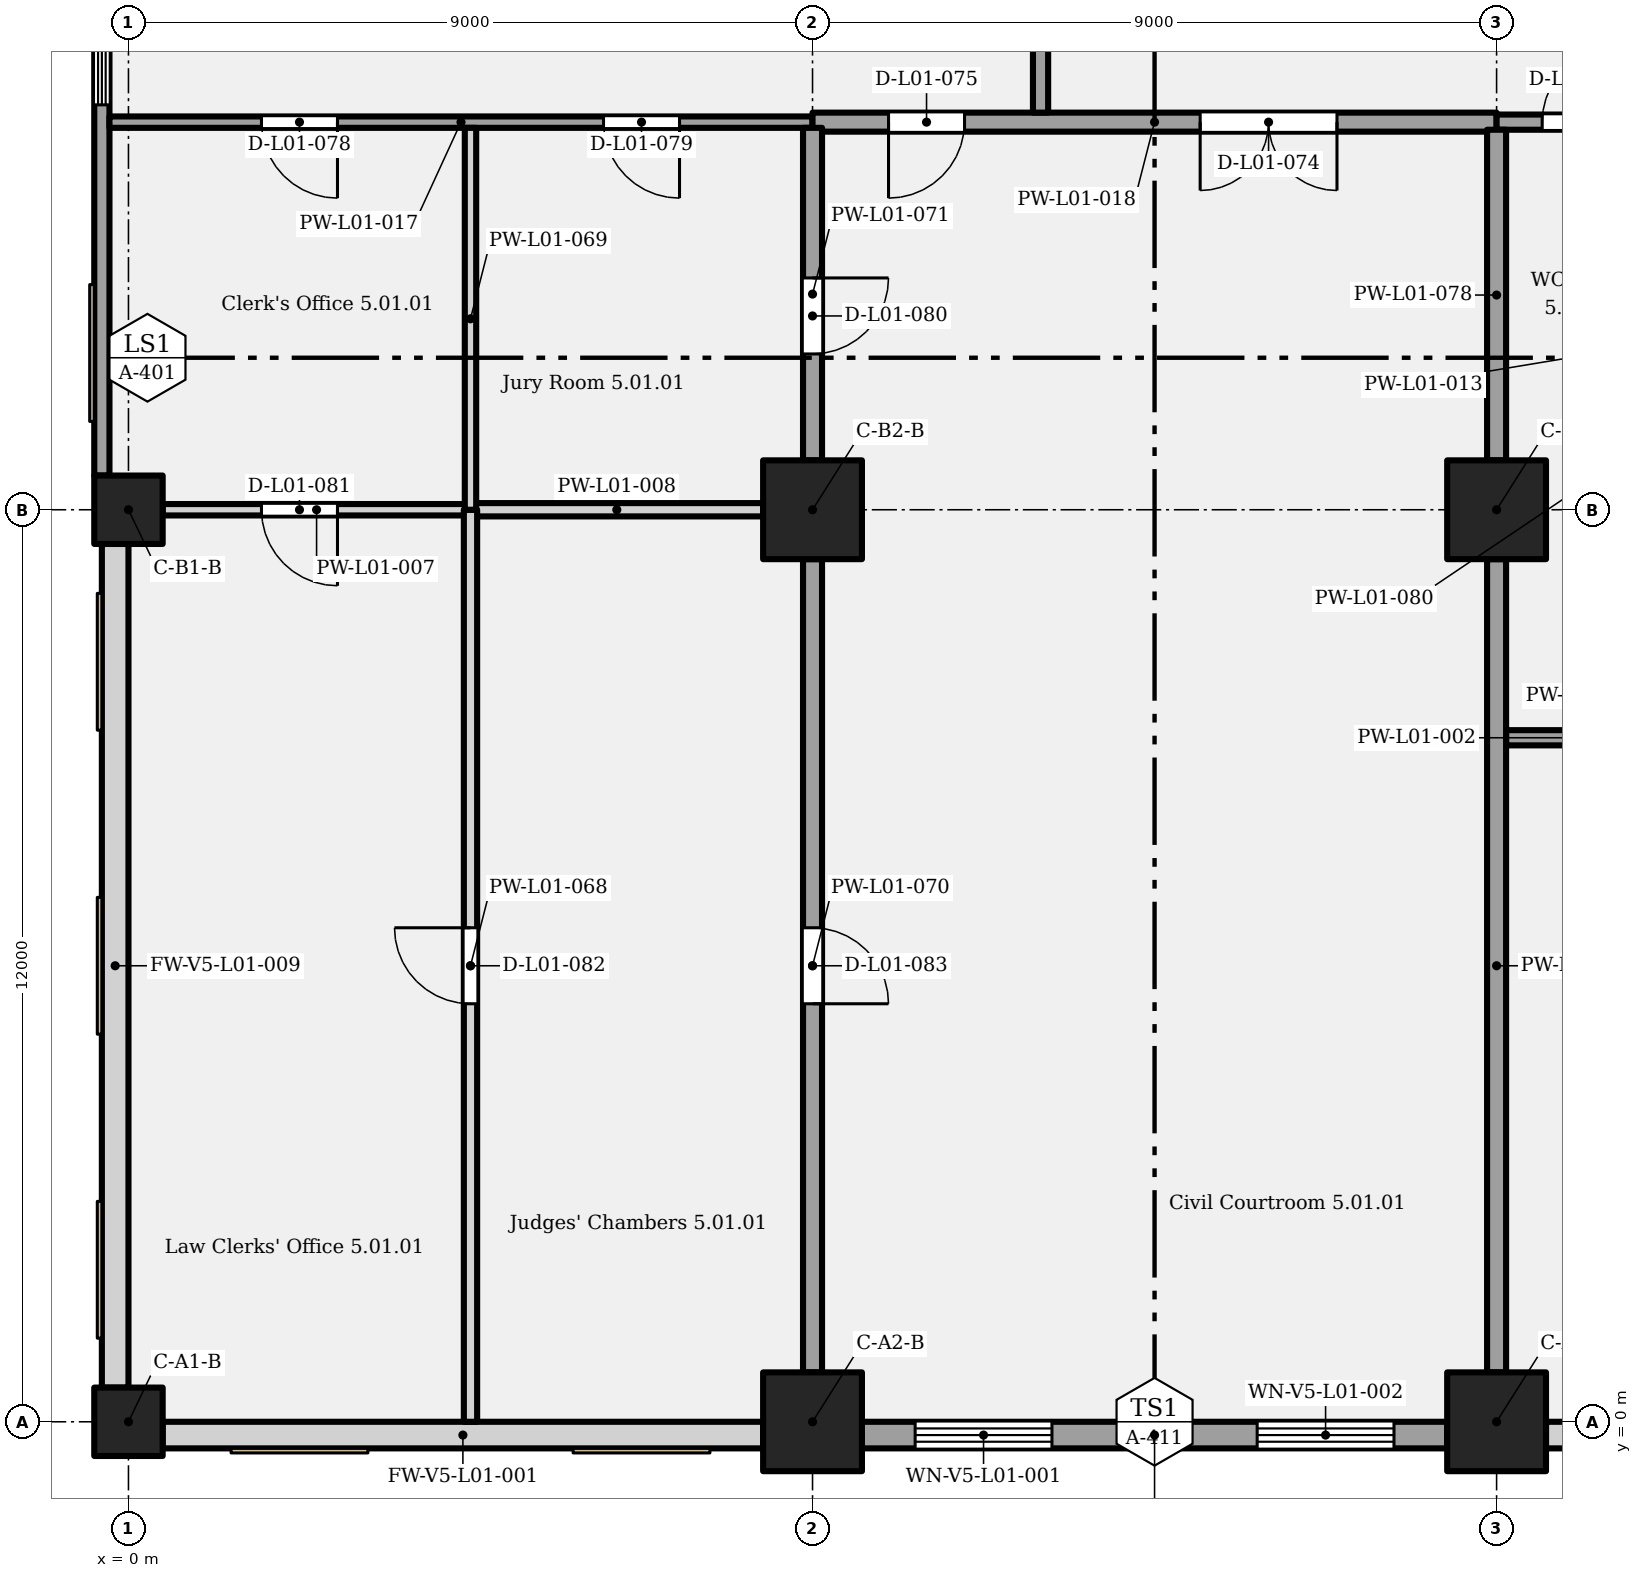
"""IFC4 building model, lengths in metres.
Left out: names, types, materials, properties, quantities, classifications, styles, units other than length and angle.
Written with IfcOpenShell. Run it as: python <this file> out.ifc"""

import sys

from ifc_helpers import new_model, si_unit, direction, frame, frame_2d, origin, origin_with_axes, origin_2d, place, context, subcontext, project, spatial, rectangle, extrude, element, fill, save


model = new_model("IFC4")
c1 = context("Model", 3, precision=1e-05, world=origin(), true_north=direction((0.0, 1.0)))
c2 = subcontext(c1, "Body", "Model", "MODEL_VIEW")
j1 = project(units=[si_unit("LENGTHUNIT", "METRE"), si_unit("PLANEANGLEUNIT", "RADIAN")], contexts=[c1])
p1 = place(None, origin())
s1 = spatial("IfcSite", under=j1, at=p1, CompositionType="ELEMENT")
p2 = place(p1, origin())
s2 = spatial("IfcBuilding", under=s1, at=p2, CompositionType="ELEMENT")
p3 = place(p2, frame((0.0, 0.0, 6.6)))
s3 = spatial("IfcBuildingStorey", under=s2, at=p3, CompositionType="ELEMENT", Elevation=6.6)
p4 = place(p3, origin_with_axes())
e1 = element("IfcColumn", 1, at=p4, inside=s3, PredefinedType="COLUMN", context=c2, shape_type="SweptSolid", body=[
    extrude(rectangle(XDim=0.9, YDim=0.9, at=origin_2d()), origin(), (0.0, 0.0, 1.0), 5.4),
])
for number, where, z_axis, x_axis in (
    (2, (9.0, 0.0, 0.0), (0.0, 0.0, 1.0), (1.0, 0.0, 0.0)),
    (3, (18.0, 0.0, 0.0), (0.0, 0.0, 1.0), (1.0, 0.0, 0.0)),
):
    element("IfcColumn", number, at=place(p3, frame(where, z_axis=z_axis, x_axis=x_axis)), inside=s3, PredefinedType="COLUMN", context=c2, shape_type="SweptSolid", body=[
        extrude(rectangle(XDim=1.3, YDim=1.3, at=origin_2d()), origin(), (0.0, 0.0, 1.0), 5.4),
    ])
p5 = place(p3, frame((0.0, 12.0, 0.0), z_axis=(0.0, 0.0, 1.0), x_axis=(1.0, 0.0, 0.0)))
e4 = element("IfcColumn", 4, at=p5, inside=s3, PredefinedType="COLUMN", context=c2, shape_type="SweptSolid", body=[
    extrude(rectangle(XDim=0.9, YDim=0.9, at=origin_2d()), origin(), (0.0, 0.0, 1.0), 5.4),
])
for number, where, z_axis, x_axis in (
    (5, (9.0, 12.0, 0.0), (0.0, 0.0, 1.0), (1.0, 0.0, 0.0)),
    (6, (18.0, 12.0, 0.0), (0.0, 0.0, 1.0), (1.0, 0.0, 0.0)),
):
    element("IfcColumn", number, at=place(p3, frame(where, z_axis=z_axis, x_axis=x_axis)), inside=s3, PredefinedType="COLUMN", context=c2, shape_type="SweptSolid", body=[
        extrude(rectangle(XDim=1.3, YDim=1.3, at=origin_2d()), origin(), (0.0, 0.0, 1.0), 5.4),
    ])
p6 = place(p3, frame((0.45, -0.175, 0.0), z_axis=(0.0, 0.0, 1.0), x_axis=(1.0, 0.0, 0.0)))
e7 = element("IfcWall", 7, at=p6, inside=s3, PredefinedType="SOLIDWALL", context=c2, shape_type="SweptSolid", body=[
    extrude(rectangle(XDim=7.9, YDim=0.35, at=frame_2d((3.95, 0.0))), origin(), (0.0, 0.0, 1.0), 5.1),
])
p7 = place(p3, frame((9.65, -0.175, 0.0), z_axis=(0.0, 0.0, 1.0), x_axis=(1.0, 0.0, 0.0)))
e8 = element("IfcWall", 8, at=p7, inside=s3, PredefinedType="SOLIDWALL", context=c2, shape_type="SweptSolid", body=[
    extrude(rectangle(XDim=7.7, YDim=0.35, at=frame_2d((3.85, 0.0))), origin(), (0.0, 0.0, 1.0), 5.1),
])
p8 = place(p7, frame((0.7, 0.0, 1.2)))
e9 = element("IfcOpeningElement", 9, at=p8, cuts=e8, PredefinedType="OPENING", context=c2, shape_type="SweptSolid", body=[
    extrude(rectangle(XDim=1.8, YDim=3.3, at=frame_2d((0.9, 1.65))), frame((0.0, 0.185, 0.0), z_axis=(0.0, -1.0, 0.0), x_axis=(1.0, 0.0, 0.0)), (0.0, 0.0, 1.0), 0.37),
])
p9 = place(p7, frame((5.2, 0.0, 1.2)))
e10 = element("IfcOpeningElement", 10, at=p9, cuts=e8, PredefinedType="OPENING", context=c2, shape_type="SweptSolid", body=[
    extrude(rectangle(XDim=1.8, YDim=3.3, at=frame_2d((0.9, 1.65))), frame((0.0, 0.185, 0.0), z_axis=(0.0, -1.0, 0.0), x_axis=(1.0, 0.0, 0.0)), (0.0, 0.0, 1.0), 0.37),
])
p10 = place(p3, frame((18.65, -0.175, 0.0), z_axis=(0.0, 0.0, 1.0), x_axis=(1.0, 0.0, 0.0)))
e11 = element("IfcWall", 11, at=p10, inside=s3, PredefinedType="SOLIDWALL", context=c2, shape_type="SweptSolid", body=[
    extrude(rectangle(XDim=7.7, YDim=0.35, at=frame_2d((3.85, 0.0))), origin(), (0.0, 0.0, 1.0), 5.1),
])
p11 = place(p3, frame((-0.175, 0.45, 0.0), z_axis=(0.0, 0.0, 1.0), x_axis=(0.0, 1.0, 0.0)))
e12 = element("IfcWall", 12, at=p11, inside=s3, PredefinedType="SOLIDWALL", context=c2, shape_type="SweptSolid", body=[
    extrude(rectangle(XDim=11.1, YDim=0.35, at=frame_2d((5.55, 0.0))), origin(), (0.0, 0.0, 1.0), 5.1),
])
p12 = place(p3, frame((-0.35, 12.45, 0.0), z_axis=(0.0, 0.0, 1.0), x_axis=(0.0, 1.0, 0.0)))
e13 = element("IfcWall", 13, at=p12, inside=s3, PredefinedType="SOLIDWALL", context=c2, shape_type="SweptSolid", body=[
    extrude(rectangle(XDim=15.6, YDim=0.2, at=frame_2d((7.8, 0.0))), origin(), (0.0, 0.0, 1.0), 5.1),
])
p13 = place(p12, frame((4.877, 0.0, 1.2)))
e14 = element("IfcOpeningElement", 14, at=p13, cuts=e13, PredefinedType="OPENING", context=c2, shape_type="SweptSolid", body=[
    extrude(rectangle(XDim=1.8, YDim=3.3, at=frame_2d((0.9, 1.65))), frame((0.0, 0.11, 0.0), z_axis=(0.0, -1.0, 0.0), x_axis=(1.0, 0.0, 0.0)), (0.0, 0.0, 1.0), 0.22),
])
p14 = place(p3, frame((18.125, 9.0, 0.0), z_axis=(0.0, 0.0, 1.0), x_axis=(1.0, 0.0, 0.0)))
e15 = element("IfcWall", 15, at=p14, inside=s3, PredefinedType="PARTITIONING", context=c2, shape_type="SweptSolid", body=[
    extrude(rectangle(XDim=2.075, YDim=0.2, at=frame_2d((1.038, 0.0))), origin(), (0.0, 0.0, 1.0), 5.1),
])
p15 = place(p3, frame((0.45, 12.0, 0.0), z_axis=(0.0, 0.0, 1.0), x_axis=(1.0, 0.0, 0.0)))
e16 = element("IfcWall", 16, at=p15, inside=s3, PredefinedType="PARTITIONING", context=c2, shape_type="SweptSolid", body=[
    extrude(rectangle(XDim=4.05, YDim=0.15, at=frame_2d((2.025, 0.0))), origin(), (0.0, 0.0, 1.0), 4.35),
])
p16 = place(p15, frame((2.3, 0.0, 0.0), z_axis=(0.0, 0.0, 1.0), x_axis=(-1.0, 0.0, 0.0)))
e17 = element("IfcOpeningElement", 17, at=p16, cuts=e16, PredefinedType="OPENING", context=c2, shape_type="SweptSolid", body=[
    extrude(rectangle(XDim=1.0, YDim=2.1, at=frame_2d((0.5, 1.05))), frame((0.0, 0.085, 0.0), z_axis=(0.0, -1.0, 0.0), x_axis=(1.0, 0.0, 0.0)), (0.0, 0.0, 1.0), 0.17),
])
p17 = place(p3, frame((4.5, 12.0, 0.0), z_axis=(0.0, 0.0, 1.0), x_axis=(1.0, 0.0, 0.0)))
e18 = element("IfcWall", 18, at=p17, inside=s3, PredefinedType="PARTITIONING", context=c2, shape_type="SweptSolid", body=[
    extrude(rectangle(XDim=3.85, YDim=0.175, at=frame_2d((1.925, 0.0))), origin(), (0.0, 0.0, 1.0), 4.35),
])
p18 = place(p3, frame((-0.25, 17.1, 0.0), z_axis=(0.0, 0.0, 1.0), x_axis=(1.0, 0.0, 0.0)))
e19 = element("IfcWall", 19, at=p18, inside=s3, PredefinedType="PARTITIONING", context=c2, shape_type="SweptSolid", body=[
    extrude(rectangle(XDim=9.25, YDim=0.15, at=frame_2d((4.625, 0.0))), origin(), (0.0, 0.0, 1.0), 5.1),
])
p19 = place(p18, frame((3.0, 0.0, 0.0), z_axis=(0.0, 0.0, 1.0), x_axis=(-1.0, 0.0, 0.0)))
e20 = element("IfcOpeningElement", 20, at=p19, cuts=e19, PredefinedType="OPENING", context=c2, shape_type="SweptSolid", body=[
    extrude(rectangle(XDim=1.0, YDim=2.1, at=frame_2d((0.5, 1.05))), frame((0.0, 0.085, 0.0), z_axis=(0.0, -1.0, 0.0), x_axis=(1.0, 0.0, 0.0)), (0.0, 0.0, 1.0), 0.17),
])
p20 = place(p18, frame((7.5, 0.0, 0.0), z_axis=(0.0, 0.0, 1.0), x_axis=(-1.0, 0.0, 0.0)))
e21 = element("IfcOpeningElement", 21, at=p20, cuts=e19, PredefinedType="OPENING", context=c2, shape_type="SweptSolid", body=[
    extrude(rectangle(XDim=1.0, YDim=2.1, at=frame_2d((0.5, 1.05))), frame((0.0, 0.085, 0.0), z_axis=(0.0, -1.0, 0.0), x_axis=(1.0, 0.0, 0.0)), (0.0, 0.0, 1.0), 0.17),
])
p21 = place(p3, frame((9.0, 17.1, 0.0), z_axis=(0.0, 0.0, 1.0), x_axis=(1.0, 0.0, 0.0)))
e22 = element("IfcWall", 22, at=p21, inside=s3, PredefinedType="PARTITIONING", context=c2, shape_type="SweptSolid", body=[
    extrude(rectangle(XDim=9.0, YDim=0.25, at=frame_2d((4.5, 0.0))), origin(), (0.0, 0.0, 1.0), 5.1),
])
p22 = place(p21, frame((6.9, 0.0, 0.0), z_axis=(0.0, 0.0, 1.0), x_axis=(-1.0, 0.0, 0.0)))
e23 = element("IfcOpeningElement", 23, at=p22, cuts=e22, PredefinedType="OPENING", context=c2, shape_type="SweptSolid", body=[
    extrude(rectangle(XDim=1.8, YDim=2.4, at=frame_2d((0.9, 1.2))), frame((0.0, 0.135, 0.0), z_axis=(0.0, -1.0, 0.0), x_axis=(1.0, 0.0, 0.0)), (0.0, 0.0, 1.0), 0.27),
])
p23 = place(p21, frame((2.0, 0.0, 0.0), z_axis=(0.0, 0.0, 1.0), x_axis=(-1.0, 0.0, 0.0)))
e24 = element("IfcOpeningElement", 24, at=p23, cuts=e22, PredefinedType="OPENING", context=c2, shape_type="SweptSolid", body=[
    extrude(rectangle(XDim=1.0, YDim=2.1, at=frame_2d((0.5, 1.05))), frame((0.0, 0.135, 0.0), z_axis=(0.0, -1.0, 0.0), x_axis=(1.0, 0.0, 0.0)), (0.0, 0.0, 1.0), 0.27),
])
p24 = place(p3, frame((18.0, 17.1, 0.0), z_axis=(0.0, 0.0, 1.0), x_axis=(1.0, 0.0, 0.0)))
e25 = element("IfcWall", 25, at=p24, inside=s3, PredefinedType="PARTITIONING", context=c2, shape_type="SweptSolid", body=[
    extrude(rectangle(XDim=4.5, YDim=0.2, at=frame_2d((2.25, 0.0))), origin(), (0.0, 0.0, 1.0), 5.1),
])
p25 = place(p24, frame((0.6, 0.0, 0.0)))
e26 = element("IfcOpeningElement", 26, at=p25, cuts=e25, PredefinedType="OPENING", context=c2, shape_type="SweptSolid", body=[
    extrude(rectangle(XDim=1.0, YDim=2.1, at=frame_2d((0.5, 1.05))), frame((0.0, 0.11, 0.0), z_axis=(0.0, -1.0, 0.0), x_axis=(1.0, 0.0, 0.0)), (0.0, 0.0, 1.0), 0.22),
])
p26 = place(p3, frame((4.5, 0.0, 0.0), z_axis=(0.0, 0.0, 1.0), x_axis=(0.0, 1.0, 0.0)))
e27 = element("IfcWall", 27, at=p26, inside=s3, PredefinedType="PARTITIONING", context=c2, shape_type="SweptSolid", body=[
    extrude(rectangle(XDim=12.0, YDim=0.175, at=frame_2d((6.0, 0.0))), origin(), (0.0, 0.0, 1.0), 5.1),
])
p27 = place(p26, frame((5.5, 0.0, 0.0)))
e28 = element("IfcOpeningElement", 28, at=p27, cuts=e27, PredefinedType="OPENING", context=c2, shape_type="SweptSolid", body=[
    extrude(rectangle(XDim=1.0, YDim=2.1, at=frame_2d((0.5, 1.05))), frame((0.0, 0.097, 0.0), z_axis=(0.0, -1.0, 0.0), x_axis=(1.0, 0.0, 0.0)), (0.0, 0.0, 1.0), 0.195),
])
p28 = place(p3, frame((4.5, 12.0, 0.0), z_axis=(0.0, 0.0, 1.0), x_axis=(0.0, 1.0, 0.0)))
e29 = element("IfcWall", 29, at=p28, inside=s3, PredefinedType="PARTITIONING", context=c2, shape_type="SweptSolid", body=[
    extrude(rectangle(XDim=5.025, YDim=0.15, at=frame_2d((2.512, 0.0))), origin(), (0.0, 0.0, 1.0), 5.1),
])
p29 = place(p3, frame((9.0, 0.65, 0.0), z_axis=(0.0, 0.0, 1.0), x_axis=(0.0, 1.0, 0.0)))
e30 = element("IfcWall", 30, at=p29, inside=s3, PredefinedType="PARTITIONING", context=c2, shape_type="SweptSolid", body=[
    extrude(rectangle(XDim=10.7, YDim=0.25, at=frame_2d((5.35, 0.0))), origin(), (0.0, 0.0, 1.0), 4.35),
])
p30 = place(p29, frame((5.85, 0.0, 0.0), z_axis=(0.0, 0.0, 1.0), x_axis=(-1.0, 0.0, 0.0)))
e31 = element("IfcOpeningElement", 31, at=p30, cuts=e30, PredefinedType="OPENING", context=c2, shape_type="SweptSolid", body=[
    extrude(rectangle(XDim=1.0, YDim=2.1, at=frame_2d((0.5, 1.05))), frame((0.0, 0.135, 0.0), z_axis=(0.0, -1.0, 0.0), x_axis=(1.0, 0.0, 0.0)), (0.0, 0.0, 1.0), 0.27),
])
p31 = place(p3, frame((9.0, 12.65, 0.0), z_axis=(0.0, 0.0, 1.0), x_axis=(0.0, 1.0, 0.0)))
e32 = element("IfcWall", 32, at=p31, inside=s3, PredefinedType="PARTITIONING", context=c2, shape_type="SweptSolid", body=[
    extrude(rectangle(XDim=4.375, YDim=0.25, at=frame_2d((2.188, 0.0))), origin(), (0.0, 0.0, 1.0), 4.15),
])
p32 = place(p31, frame((2.4, 0.0, 0.0), z_axis=(0.0, 0.0, 1.0), x_axis=(-1.0, 0.0, 0.0)))
e33 = element("IfcOpeningElement", 33, at=p32, cuts=e32, PredefinedType="OPENING", context=c2, shape_type="SweptSolid", body=[
    extrude(rectangle(XDim=1.0, YDim=2.1, at=frame_2d((0.5, 1.05))), frame((0.0, 0.135, 0.0), z_axis=(0.0, -1.0, 0.0), x_axis=(1.0, 0.0, 0.0)), (0.0, 0.0, 1.0), 0.27),
])
p33 = place(p3, frame((12.0, 17.225, 0.0), z_axis=(0.0, 0.0, 1.0), x_axis=(0.0, 1.0, 0.0)))
e34 = element("IfcWall", 34, at=p33, inside=s3, PredefinedType="PARTITIONING", context=c2, shape_type="SweptSolid", body=[
    extrude(rectangle(XDim=2.15, YDim=0.2, at=frame_2d((1.075, 0.0))), origin(), (0.0, 0.0, 1.0), 5.1),
])
p34 = place(p3, frame((18.0, 0.65, 0.0), z_axis=(0.0, 0.0, 1.0), x_axis=(0.0, 1.0, 0.0)))
e35 = element("IfcWall", 35, at=p34, inside=s3, PredefinedType="PARTITIONING", context=c2, shape_type="SweptSolid", body=[
    extrude(rectangle(XDim=10.7, YDim=0.25, at=frame_2d((5.35, 0.0))), origin(), (0.0, 0.0, 1.0), 4.35),
])
p35 = place(p3, frame((18.0, 12.65, 0.0), z_axis=(0.0, 0.0, 1.0), x_axis=(0.0, 1.0, 0.0)))
e36 = element("IfcWall", 36, at=p35, inside=s3, PredefinedType="PARTITIONING", context=c2, shape_type="SweptSolid", body=[
    extrude(rectangle(XDim=4.35, YDim=0.25, at=frame_2d((2.175, 0.0))), origin(), (0.0, 0.0, 1.0), 4.15),
])
p36 = place(p8, origin())
e37 = element("IfcWindow", 37, at=p36, inside=s3, PartitioningType="SINGLE_PANEL", PredefinedType="WINDOW", context=c2, shape_type="SweptSolid", body=[
    extrude(rectangle(XDim=1.8, YDim=3.3, at=frame_2d((0.9, 1.65))), frame((0.0, 0.03, 0.0), z_axis=(0.0, -1.0, 0.0), x_axis=(1.0, 0.0, 0.0)), (0.0, 0.0, 1.0), 0.06),
])
fill(e9, e37)
p37 = place(p9, origin())
e38 = element("IfcWindow", 38, at=p37, inside=s3, PartitioningType="SINGLE_PANEL", PredefinedType="WINDOW", context=c2, shape_type="SweptSolid", body=[
    extrude(rectangle(XDim=1.8, YDim=3.3, at=frame_2d((0.9, 1.65))), frame((0.0, 0.03, 0.0), z_axis=(0.0, -1.0, 0.0), x_axis=(1.0, 0.0, 0.0)), (0.0, 0.0, 1.0), 0.06),
])
fill(e10, e38)
p38 = place(p13, origin())
e39 = element("IfcWindow", 39, at=p38, inside=s3, PartitioningType="SINGLE_PANEL", PredefinedType="WINDOW", context=c2, shape_type="SweptSolid", body=[
    extrude(rectangle(XDim=1.8, YDim=3.3, at=frame_2d((0.9, 1.65))), frame((0.0, 0.03, 0.0), z_axis=(0.0, -1.0, 0.0), x_axis=(1.0, 0.0, 0.0)), (0.0, 0.0, 1.0), 0.06),
])
fill(e14, e39)
p39 = place(p22, origin())
e40 = element("IfcDoor", 40, at=p39, inside=s3, OperationType="DOUBLE_DOOR_SINGLE_SWING", PredefinedType="DOOR", context=c2, shape_type="SweptSolid", body=[
    extrude(rectangle(XDim=1.8, YDim=2.4, at=frame_2d((0.9, 1.2))), frame((0.0, 0.025, 0.0), z_axis=(0.0, -1.0, 0.0), x_axis=(1.0, 0.0, 0.0)), (0.0, 0.0, 1.0), 0.05),
])
fill(e23, e40)
p40 = place(p23, origin())
e41 = element("IfcDoor", 41, at=p40, inside=s3, OperationType="SINGLE_SWING_RIGHT", PredefinedType="DOOR", context=c2, shape_type="SweptSolid", body=[
    extrude(rectangle(XDim=1.0, YDim=2.1, at=frame_2d((0.5, 1.05))), frame((0.0, 0.025, 0.0), z_axis=(0.0, -1.0, 0.0), x_axis=(1.0, 0.0, 0.0)), (0.0, 0.0, 1.0), 0.05),
])
fill(e24, e41)
p41 = place(p19, origin())
e42 = element("IfcDoor", 42, at=p41, inside=s3, OperationType="SINGLE_SWING_LEFT", PredefinedType="DOOR", context=c2, shape_type="SweptSolid", body=[
    extrude(rectangle(XDim=1.0, YDim=2.1, at=frame_2d((0.5, 1.05))), frame((0.0, 0.025, 0.0), z_axis=(0.0, -1.0, 0.0), x_axis=(1.0, 0.0, 0.0)), (0.0, 0.0, 1.0), 0.05),
])
fill(e20, e42)
p42 = place(p20, origin())
e43 = element("IfcDoor", 43, at=p42, inside=s3, OperationType="SINGLE_SWING_LEFT", PredefinedType="DOOR", context=c2, shape_type="SweptSolid", body=[
    extrude(rectangle(XDim=1.0, YDim=2.1, at=frame_2d((0.5, 1.05))), frame((0.0, 0.025, 0.0), z_axis=(0.0, -1.0, 0.0), x_axis=(1.0, 0.0, 0.0)), (0.0, 0.0, 1.0), 0.05),
])
fill(e21, e43)
p43 = place(p32, origin())
e44 = element("IfcDoor", 44, at=p43, inside=s3, OperationType="SINGLE_SWING_LEFT", PredefinedType="DOOR", context=c2, shape_type="SweptSolid", body=[
    extrude(rectangle(XDim=1.0, YDim=2.1, at=frame_2d((0.5, 1.05))), frame((0.0, 0.025, 0.0), z_axis=(0.0, -1.0, 0.0), x_axis=(1.0, 0.0, 0.0)), (0.0, 0.0, 1.0), 0.05),
])
fill(e33, e44)
p44 = place(p16, origin())
e45 = element("IfcDoor", 45, at=p44, inside=s3, OperationType="SINGLE_SWING_LEFT", PredefinedType="DOOR", context=c2, shape_type="SweptSolid", body=[
    extrude(rectangle(XDim=1.0, YDim=2.1, at=frame_2d((0.5, 1.05))), frame((0.0, 0.025, 0.0), z_axis=(0.0, -1.0, 0.0), x_axis=(1.0, 0.0, 0.0)), (0.0, 0.0, 1.0), 0.05),
])
fill(e17, e45)
p45 = place(p27, origin())
e46 = element("IfcDoor", 46, at=p45, inside=s3, OperationType="SINGLE_SWING_RIGHT", PredefinedType="DOOR", context=c2, shape_type="SweptSolid", body=[
    extrude(rectangle(XDim=1.0, YDim=2.1, at=frame_2d((0.5, 1.05))), frame((0.0, 0.025, 0.0), z_axis=(0.0, -1.0, 0.0), x_axis=(1.0, 0.0, 0.0)), (0.0, 0.0, 1.0), 0.05),
])
fill(e28, e46)
p46 = place(p30, origin())
e47 = element("IfcDoor", 47, at=p46, inside=s3, OperationType="SINGLE_SWING_RIGHT", PredefinedType="DOOR", context=c2, shape_type="SweptSolid", body=[
    extrude(rectangle(XDim=1.0, YDim=2.1, at=frame_2d((0.5, 1.05))), frame((0.0, 0.025, 0.0), z_axis=(0.0, -1.0, 0.0), x_axis=(1.0, 0.0, 0.0)), (0.0, 0.0, 1.0), 0.05),
])
fill(e31, e47)
p47 = place(p25, origin())
e48 = element("IfcDoor", 48, at=p47, inside=s3, OperationType="SINGLE_SWING_RIGHT", PredefinedType="DOOR", context=c2, shape_type="SweptSolid", body=[
    extrude(rectangle(XDim=1.0, YDim=2.1, at=frame_2d((0.5, 1.05))), frame((0.0, 0.025, 0.0), z_axis=(0.0, -1.0, 0.0), x_axis=(1.0, 0.0, 0.0)), (0.0, 0.0, 1.0), 0.05),
])
fill(e26, e48)
save(model, sys.argv[1])
